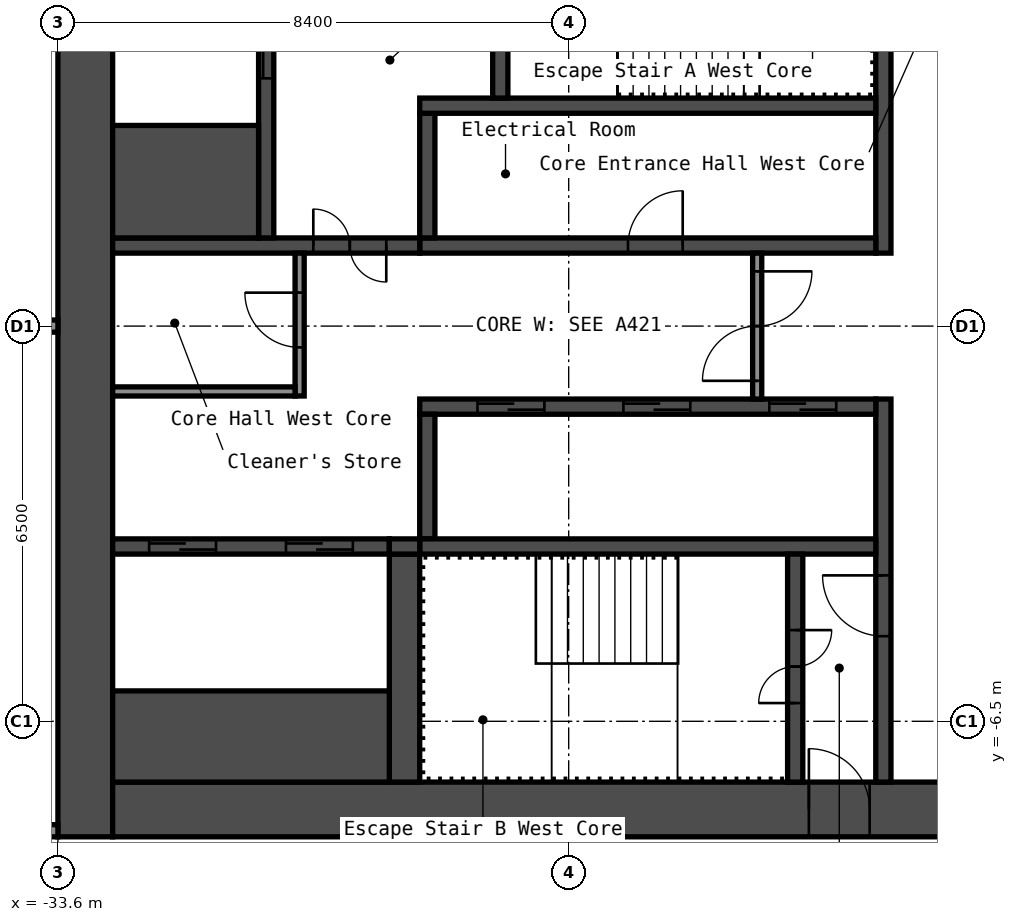
"""IFC4 building model, lengths in metres.
Left out: names, types, materials, properties, quantities, classifications, styles, units other than length and angle.
Written with IfcOpenShell. Run it as: python <this file> out.ifc"""

import sys

from ifc_helpers import new_model, si_unit, direction, frame, frame_2d, origin, place, context, subcontext, project, spatial, rectangle, extrude, element, fill, save


model = new_model("IFC4")
c1 = context("Model", 3, precision=1e-05, world=origin(), true_north=direction((0.0, 1.0)))
c2 = subcontext(c1, "Body", "Model", "MODEL_VIEW")
j1 = project(units=[si_unit("LENGTHUNIT", "METRE"), si_unit("PLANEANGLEUNIT", "RADIAN")], contexts=[c1])
p1 = place(None, origin())
s1 = spatial("IfcSite", under=j1, at=p1, CompositionType="ELEMENT")
p2 = place(p1, origin())
s2 = spatial("IfcBuilding", under=s1, at=p2, CompositionType="ELEMENT")
p3 = place(p2, frame((0.0, 0.0, 134.2)))
s3 = spatial("IfcBuildingStorey", under=s2, at=p3, CompositionType="ELEMENT", Elevation=134.2)
p4 = place(p3, frame((-33.15, -8.4, 0.0), z_axis=(0.0, 0.0, 1.0), x_axis=(0.0, 1.0, 0.0)))
e1 = element("IfcWall", 1, at=p4, inside=s3, PredefinedType="SHEAR", context=c2, shape_type="SweptSolid", body=[
    extrude(rectangle(XDim=16.8, YDim=0.9, at=frame_2d((8.4, 0.0))), origin(), (0.0, 0.0, 1.0), 2.75),
])
p5 = place(p3, frame((-32.7, -7.95, 0.0), z_axis=(0.0, 0.0, 1.0), x_axis=(1.0, 0.0, 0.0)))
e2 = element("IfcWall", 2, at=p5, inside=s3, PredefinedType="SHEAR", context=c2, shape_type="SweptSolid", body=[
    extrude(rectangle(XDim=15.0, YDim=0.9, at=frame_2d((7.5, 0.0))), origin(), (0.0, 0.0, 1.0), 2.75),
])
p6 = place(p5, frame((11.45, 0.0, 0.0)))
e3 = element("IfcOpeningElement", 3, at=p6, cuts=e2, PredefinedType="OPENING", context=c2, shape_type="SweptSolid", body=[
    extrude(rectangle(XDim=1.0, YDim=2.1, at=frame_2d((0.5, 1.05))), frame((0.0, 0.46, 0.0), z_axis=(0.0, -1.0, 0.0), x_axis=(1.0, 0.0, 0.0)), (0.0, 0.0, 1.0), 0.92),
])
p7 = place(p3, frame((-20.025, 1.2, 0.0), z_axis=(0.0, 0.0, 1.0), x_axis=(0.0, 1.0, 0.0)))
e4 = element("IfcWall", 4, at=p7, inside=s3, PredefinedType="SHEAR", context=c2, shape_type="SweptSolid", body=[
    extrude(rectangle(XDim=6.3, YDim=0.25, at=frame_2d((3.15, 0.0))), origin(), (0.0, 0.0, 1.0), 2.75),
])
p8 = place(p3, frame((-20.025, -7.5, 0.0), z_axis=(0.0, 0.0, 1.0), x_axis=(0.0, 1.0, 0.0)))
e5 = element("IfcWall", 5, at=p8, inside=s3, PredefinedType="SHEAR", context=c2, shape_type="SweptSolid", body=[
    extrude(rectangle(XDim=6.3, YDim=0.25, at=frame_2d((3.15, 0.0))), origin(), (0.0, 0.0, 1.0), 2.75),
])
p9 = place(p8, frame((2.4, 0.0, 0.0)))
e6 = element("IfcOpeningElement", 6, at=p9, cuts=e5, PredefinedType="OPENING", context=c2, shape_type="SweptSolid", body=[
    extrude(rectangle(XDim=1.0, YDim=2.1, at=frame_2d((0.5, 1.05))), frame((0.0, 0.135, 0.0), z_axis=(0.0, -1.0, 0.0), x_axis=(1.0, 0.0, 0.0)), (0.0, 0.0, 1.0), 0.27),
])
p10 = place(p3, frame((-27.65, 1.325, 0.0), z_axis=(0.0, 0.0, 1.0), x_axis=(1.0, 0.0, 0.0)))
e7 = element("IfcWall", 7, at=p10, inside=s3, PredefinedType="SHEAR", context=c2, shape_type="SweptSolid", body=[
    extrude(rectangle(XDim=7.5, YDim=0.25, at=frame_2d((3.75, 0.0))), origin(), (0.0, 0.0, 1.0), 2.75),
])
p11 = place(p10, frame((3.425, 0.0, 0.0)))
e8 = element("IfcOpeningElement", 8, at=p11, cuts=e7, PredefinedType="OPENING", context=c2, shape_type="SweptSolid", body=[
    extrude(rectangle(XDim=0.9, YDim=2.1, at=frame_2d((0.45, 1.05))), frame((0.0, 0.135, 0.0), z_axis=(0.0, -1.0, 0.0), x_axis=(1.0, 0.0, 0.0)), (0.0, 0.0, 1.0), 0.27),
])
p12 = place(p3, frame((-27.525, 1.45, 0.0), z_axis=(0.0, 0.0, 1.0), x_axis=(0.0, 1.0, 0.0)))
e9 = element("IfcWall", 9, at=p12, inside=s3, PredefinedType="SHEAR", context=c2, shape_type="SweptSolid", body=[
    extrude(rectangle(XDim=2.05, YDim=0.25, at=frame_2d((1.025, 0.0))), origin(), (0.0, 0.0, 1.0), 2.75),
])
p13 = place(p3, frame((-27.65, 3.625, 0.0), z_axis=(0.0, 0.0, 1.0), x_axis=(1.0, 0.0, 0.0)))
e10 = element("IfcWall", 10, at=p13, inside=s3, PredefinedType="SHEAR", context=c2, shape_type="SweptSolid", body=[
    extrude(rectangle(XDim=7.5, YDim=0.25, at=frame_2d((3.75, 0.0))), origin(), (0.0, 0.0, 1.0), 2.75),
])
p14 = place(p3, frame((-26.325, 3.75, 0.0), z_axis=(0.0, 0.0, 1.0), x_axis=(0.0, 1.0, 0.0)))
e11 = element("IfcWall", 11, at=p14, inside=s3, PredefinedType="SHEAR", context=c2, shape_type="SweptSolid", body=[
    extrude(rectangle(XDim=3.75, YDim=0.25, at=frame_2d((1.875, 0.0))), origin(), (0.0, 0.0, 1.0), 2.75),
])
p15 = place(p14, frame((1.25, 0.0, 0.0)))
e12 = element("IfcOpeningElement", 12, at=p15, cuts=e11, PredefinedType="OPENING", context=c2, shape_type="SweptSolid", body=[
    extrude(rectangle(XDim=1.2, YDim=2.1, at=frame_2d((0.6, 1.05))), frame((0.0, 0.135, 0.0), z_axis=(0.0, -1.0, 0.0), x_axis=(1.0, 0.0, 0.0)), (0.0, 0.0, 1.0), 0.27),
])
p16 = place(p3, frame((-32.7, 1.325, 0.0), z_axis=(0.0, 0.0, 1.0), x_axis=(1.0, 0.0, 0.0)))
e13 = element("IfcWall", 13, at=p16, inside=s3, PredefinedType="SHEAR", context=c2, shape_type="SweptSolid", body=[
    extrude(rectangle(XDim=5.05, YDim=0.25, at=frame_2d((2.525, 0.0))), origin(), (0.0, 0.0, 1.0), 2.75),
])
p17 = place(p16, frame((3.3, 0.0, 0.0)))
e14 = element("IfcOpeningElement", 14, at=p17, cuts=e13, PredefinedType="OPENING", context=c2, shape_type="SweptSolid", body=[
    extrude(rectangle(XDim=1.2, YDim=2.1, at=frame_2d((0.6, 1.05))), frame((0.0, 0.135, 0.0), z_axis=(0.0, -1.0, 0.0), x_axis=(1.0, 0.0, 0.0)), (0.0, 0.0, 1.0), 0.27),
])
p18 = place(p3, frame((-30.175, 1.45, 0.0), z_axis=(0.0, 0.0, 1.0), x_axis=(0.0, 1.0, 0.0)))
e15 = element("IfcWall", 15, at=p18, inside=s3, PredefinedType="SHEAR", context=c2, shape_type="SweptSolid", body=[
    extrude(rectangle(XDim=6.05, YDim=0.25, at=frame_2d((3.025, 0.0))), origin(), (0.0, 0.0, 1.0), 2.75),
])
p19 = place(p18, frame((2.625, 0.0, 0.0)))
e16 = element("IfcOpeningElement", 16, at=p19, cuts=e15, PredefinedType="OPENING", context=c2, shape_type="SweptSolid", body=[
    extrude(rectangle(XDim=1.1, YDim=2.1, at=frame_2d((0.55, 1.05))), frame((0.0, 0.135, 0.0), z_axis=(0.0, -1.0, 0.0), x_axis=(1.0, 0.0, 0.0)), (0.0, 0.0, 1.0), 0.27),
])
p20 = place(p3, frame((-32.7, 2.375, 0.0), z_axis=(0.0, 0.0, 1.0), x_axis=(1.0, 0.0, 0.0)))
e17 = element("IfcWall", 17, at=p20, inside=s3, PredefinedType="SHEAR", context=c2, shape_type="SweptSolid", body=[
    extrude(rectangle(XDim=2.4, YDim=1.85, at=frame_2d((1.2, 0.0))), origin(), (0.0, 0.0, 1.0), 2.75),
])
p21 = place(p3, frame((-27.65, -1.325, 0.0), z_axis=(0.0, 0.0, 1.0), x_axis=(1.0, 0.0, 0.0)))
e18 = element("IfcWall", 18, at=p21, inside=s3, PredefinedType="SHEAR", context=c2, shape_type="SweptSolid", body=[
    extrude(rectangle(XDim=7.5, YDim=0.25, at=frame_2d((3.75, 0.0))), origin(), (0.0, 0.0, 1.0), 2.75),
])
p22 = place(p21, frame((5.75, 0.0, 0.0)))
e19 = element("IfcOpeningElement", 19, at=p22, cuts=e18, PredefinedType="OPENING", context=c2, shape_type="SweptSolid", body=[
    extrude(rectangle(XDim=1.1, YDim=2.1, at=frame_2d((0.55, 1.05))), frame((0.0, 0.135, 0.0), z_axis=(0.0, -1.0, 0.0), x_axis=(1.0, 0.0, 0.0)), (0.0, 0.0, 1.0), 0.27),
])
p23 = place(p21, frame((3.35, 0.0, 0.0)))
e20 = element("IfcOpeningElement", 20, at=p23, cuts=e18, PredefinedType="OPENING", context=c2, shape_type="SweptSolid", body=[
    extrude(rectangle(XDim=1.1, YDim=2.1, at=frame_2d((0.55, 1.05))), frame((0.0, 0.135, 0.0), z_axis=(0.0, -1.0, 0.0), x_axis=(1.0, 0.0, 0.0)), (0.0, 0.0, 1.0), 0.27),
])
p24 = place(p21, frame((0.95, 0.0, 0.0)))
e21 = element("IfcOpeningElement", 21, at=p24, cuts=e18, PredefinedType="OPENING", context=c2, shape_type="SweptSolid", body=[
    extrude(rectangle(XDim=1.1, YDim=2.1, at=frame_2d((0.55, 1.05))), frame((0.0, 0.135, 0.0), z_axis=(0.0, -1.0, 0.0), x_axis=(1.0, 0.0, 0.0)), (0.0, 0.0, 1.0), 0.27),
])
p25 = place(p3, frame((-27.525, -3.5, 0.0), z_axis=(0.0, 0.0, 1.0), x_axis=(0.0, 1.0, 0.0)))
e22 = element("IfcWall", 22, at=p25, inside=s3, PredefinedType="SHEAR", context=c2, shape_type="SweptSolid", body=[
    extrude(rectangle(XDim=2.05, YDim=0.25, at=frame_2d((1.025, 0.0))), origin(), (0.0, 0.0, 1.0), 2.75),
])
p26 = place(p3, frame((-27.65, -3.625, 0.0), z_axis=(0.0, 0.0, 1.0), x_axis=(1.0, 0.0, 0.0)))
e23 = element("IfcWall", 23, at=p26, inside=s3, PredefinedType="SHEAR", context=c2, shape_type="SweptSolid", body=[
    extrude(rectangle(XDim=7.5, YDim=0.25, at=frame_2d((3.75, 0.0))), origin(), (0.0, 0.0, 1.0), 2.75),
])
p27 = place(p3, frame((-21.475, -7.5, 0.0), z_axis=(0.0, 0.0, 1.0), x_axis=(0.0, 1.0, 0.0)))
e24 = element("IfcWall", 24, at=p27, inside=s3, PredefinedType="SHEAR", context=c2, shape_type="SweptSolid", body=[
    extrude(rectangle(XDim=3.75, YDim=0.25, at=frame_2d((1.875, 0.0))), origin(), (0.0, 0.0, 1.0), 2.75),
])
p28 = place(p27, frame((1.3, 0.0, 0.0)))
e25 = element("IfcOpeningElement", 25, at=p28, cuts=e24, PredefinedType="OPENING", context=c2, shape_type="SweptSolid", body=[
    extrude(rectangle(XDim=1.2, YDim=2.1, at=frame_2d((0.6, 1.05))), frame((0.0, 0.135, 0.0), z_axis=(0.0, -1.0, 0.0), x_axis=(1.0, 0.0, 0.0)), (0.0, 0.0, 1.0), 0.27),
])
p29 = place(p3, frame((-27.9, -7.5, 0.0), z_axis=(0.0, 0.0, 1.0), x_axis=(0.0, 1.0, 0.0)))
e26 = element("IfcWall", 26, at=p29, inside=s3, PredefinedType="SHEAR", context=c2, shape_type="SweptSolid", body=[
    extrude(rectangle(XDim=3.75, YDim=0.5, at=frame_2d((1.875, 0.0))), origin(), (0.0, 0.0, 1.0), 2.75),
])
p30 = place(p3, frame((-32.7, -3.625, 0.0), z_axis=(0.0, 0.0, 1.0), x_axis=(1.0, 0.0, 0.0)))
e27 = element("IfcWall", 27, at=p30, inside=s3, PredefinedType="SHEAR", context=c2, shape_type="SweptSolid", body=[
    extrude(rectangle(XDim=4.55, YDim=0.25, at=frame_2d((2.275, 0.0))), origin(), (0.0, 0.0, 1.0), 2.75),
])
p31 = place(p30, frame((2.85, 0.0, 0.0)))
e28 = element("IfcOpeningElement", 28, at=p31, cuts=e27, PredefinedType="OPENING", context=c2, shape_type="SweptSolid", body=[
    extrude(rectangle(XDim=1.1, YDim=2.1, at=frame_2d((0.55, 1.05))), frame((0.0, 0.135, 0.0), z_axis=(0.0, -1.0, 0.0), x_axis=(1.0, 0.0, 0.0)), (0.0, 0.0, 1.0), 0.27),
])
p32 = place(p30, frame((0.6, 0.0, 0.0)))
e29 = element("IfcOpeningElement", 29, at=p32, cuts=e27, PredefinedType="OPENING", context=c2, shape_type="SweptSolid", body=[
    extrude(rectangle(XDim=1.1, YDim=2.1, at=frame_2d((0.55, 1.05))), frame((0.0, 0.135, 0.0), z_axis=(0.0, -1.0, 0.0), x_axis=(1.0, 0.0, 0.0)), (0.0, 0.0, 1.0), 0.27),
])
p33 = place(p3, frame((-32.7, -6.75, 0.0), z_axis=(0.0, 0.0, 1.0), x_axis=(1.0, 0.0, 0.0)))
e30 = element("IfcWall", 30, at=p33, inside=s3, PredefinedType="SHEAR", context=c2, shape_type="SweptSolid", body=[
    extrude(rectangle(XDim=4.55, YDim=1.5, at=frame_2d((2.275, 0.0))), origin(), (0.0, 0.0, 1.0), 2.75),
])
p34 = place(p3, frame((-28.15, -3.625, 0.0), z_axis=(0.0, 0.0, 1.0), x_axis=(1.0, 0.0, 0.0)))
e31 = element("IfcWall", 31, at=p34, inside=s3, PredefinedType="SHEAR", context=c2, shape_type="SweptSolid", body=[
    extrude(rectangle(XDim=0.5, YDim=0.25, at=frame_2d((0.25, 0.0))), origin(), (0.0, 0.0, 1.0), 2.75),
])
p35 = place(p3, frame((-22.1, -1.2, 0.0), z_axis=(0.0, 0.0, 1.0), x_axis=(0.0, 1.0, 0.0)))
e32 = element("IfcWall", 32, at=p35, inside=s3, PredefinedType="PARTITIONING", context=c2, shape_type="SweptSolid", body=[
    extrude(rectangle(XDim=2.4, YDim=0.15, at=frame_2d((1.2, 0.0))), origin(), (0.0, 0.0, 1.0), 2.75),
])
p36 = place(p35, frame((0.3, 0.0, 0.0)))
e33 = element("IfcOpeningElement", 33, at=p36, cuts=e32, PredefinedType="OPENING", context=c2, shape_type="SweptSolid", body=[
    extrude(rectangle(XDim=1.8, YDim=2.1, at=frame_2d((0.9, 1.05))), frame((0.0, 0.085, 0.0), z_axis=(0.0, -1.0, 0.0), x_axis=(1.0, 0.0, 0.0)), (0.0, 0.0, 1.0), 0.17),
])
p37 = place(p3, frame((-29.625, -1.15, 0.0), z_axis=(0.0, 0.0, 1.0), x_axis=(0.0, 1.0, 0.0)))
e34 = element("IfcWall", 34, at=p37, inside=s3, PredefinedType="PARTITIONING", context=c2, shape_type="SweptSolid", body=[
    extrude(rectangle(XDim=2.35, YDim=0.15, at=frame_2d((1.175, 0.0))), origin(), (0.0, 0.0, 1.0), 2.75),
])
p38 = place(p37, frame((0.8, 0.0, 0.0)))
e35 = element("IfcOpeningElement", 35, at=p38, cuts=e34, PredefinedType="OPENING", context=c2, shape_type="SweptSolid", body=[
    extrude(rectangle(XDim=0.9, YDim=2.1, at=frame_2d((0.45, 1.05))), frame((0.0, 0.085, 0.0), z_axis=(0.0, -1.0, 0.0), x_axis=(1.0, 0.0, 0.0)), (0.0, 0.0, 1.0), 0.17),
])
p39 = place(p3, frame((-32.7, -1.075, 0.0), z_axis=(0.0, 0.0, 1.0), x_axis=(1.0, 0.0, 0.0)))
e36 = element("IfcWall", 36, at=p39, inside=s3, PredefinedType="PARTITIONING", context=c2, shape_type="SweptSolid", body=[
    extrude(rectangle(XDim=3.0, YDim=0.15, at=frame_2d((1.5, 0.0))), origin(), (0.0, 0.0, 1.0), 2.75),
])
p40 = place(p3, frame((-40.2, -8.3, 0.0), z_axis=(0.0, 0.0, 1.0), x_axis=(1.0, 0.0, 0.0)))
e37 = element("IfcWall", 37, at=p40, inside=s3, PredefinedType="PARTITIONING", context=c2, shape_type="SweptSolid", body=[
    extrude(rectangle(XDim=6.6, YDim=0.2, at=frame_2d((3.3, 0.0))), origin(), (0.0, 0.0, 1.0), 2.75),
])
p41 = place(p40, frame((1.0, 0.0, 0.0)))
e38 = element("IfcOpeningElement", 38, at=p41, cuts=e37, PredefinedType="OPENING", context=c2, shape_type="SweptSolid", body=[
    extrude(rectangle(XDim=0.9, YDim=2.1, at=frame_2d((0.45, 1.05))), frame((0.0, 0.11, 0.0), z_axis=(0.0, -1.0, 0.0), x_axis=(1.0, 0.0, 0.0)), (0.0, 0.0, 1.0), 0.22),
])
p42 = place(p40, frame((4.3, 0.0, 0.0)))
e39 = element("IfcOpeningElement", 39, at=p42, cuts=e37, PredefinedType="OPENING", context=c2, shape_type="SweptSolid", body=[
    extrude(rectangle(XDim=0.9, YDim=2.1, at=frame_2d((0.45, 1.05))), frame((0.0, 0.11, 0.0), z_axis=(0.0, -1.0, 0.0), x_axis=(1.0, 0.0, 0.0)), (0.0, 0.0, 1.0), 0.22),
])
p43 = place(p3, frame((-40.1, 0.0, 0.0), z_axis=(0.0, 0.0, 1.0), x_axis=(1.0, 0.0, 0.0)))
e40 = element("IfcWall", 40, at=p43, inside=s3, PredefinedType="PARTITIONING", context=c2, shape_type="SweptSolid", body=[
    extrude(rectangle(XDim=6.5, YDim=0.2, at=frame_2d((3.25, 0.0))), origin(), (0.0, 0.0, 1.0), 2.75),
])
p44 = place(p6, origin())
e41 = element("IfcDoor", 41, at=p44, inside=s3, OperationType="SINGLE_SWING_RIGHT", PredefinedType="DOOR", context=c2, shape_type="SweptSolid", body=[
    extrude(rectangle(XDim=1.0, YDim=2.1, at=frame_2d((0.5, 1.05))), frame((0.0, 0.025, 0.0), z_axis=(0.0, -1.0, 0.0), x_axis=(1.0, 0.0, 0.0)), (0.0, 0.0, 1.0), 0.05),
])
fill(e3, e41)
p45 = place(p28, origin())
e42 = element("IfcDoor", 42, at=p45, inside=s3, OperationType="DOUBLE_DOOR_SINGLE_SWING", PredefinedType="DOOR", context=c2, shape_type="SweptSolid", body=[
    extrude(rectangle(XDim=1.2, YDim=2.1, at=frame_2d((0.6, 1.05))), frame((0.0, 0.025, 0.0), z_axis=(0.0, -1.0, 0.0), x_axis=(1.0, 0.0, 0.0)), (0.0, 0.0, 1.0), 0.05),
])
fill(e25, e42)
p46 = place(p9, origin())
e43 = element("IfcDoor", 43, at=p46, inside=s3, OperationType="SINGLE_SWING_LEFT", PredefinedType="DOOR", context=c2, shape_type="SweptSolid", body=[
    extrude(rectangle(XDim=1.0, YDim=2.1, at=frame_2d((0.5, 1.05))), frame((0.0, 0.025, 0.0), z_axis=(0.0, -1.0, 0.0), x_axis=(1.0, 0.0, 0.0)), (0.0, 0.0, 1.0), 0.05),
])
fill(e6, e43)
p47 = place(p17, origin())
e44 = element("IfcDoor", 44, at=p47, inside=s3, OperationType="DOUBLE_DOOR_SINGLE_SWING", PredefinedType="DOOR", context=c2, shape_type="SweptSolid", body=[
    extrude(rectangle(XDim=1.2, YDim=2.1, at=frame_2d((0.6, 1.05))), frame((0.0, 0.025, 0.0), z_axis=(0.0, -1.0, 0.0), x_axis=(1.0, 0.0, 0.0)), (0.0, 0.0, 1.0), 0.05),
])
fill(e14, e44)
p48 = place(p36, origin())
e45 = element("IfcDoor", 45, at=p48, inside=s3, OperationType="DOUBLE_DOOR_SINGLE_SWING", PredefinedType="DOOR", context=c2, shape_type="SweptSolid", body=[
    extrude(rectangle(XDim=1.8, YDim=2.1, at=frame_2d((0.9, 1.05))), frame((0.0, 0.025, 0.0), z_axis=(0.0, -1.0, 0.0), x_axis=(1.0, 0.0, 0.0)), (0.0, 0.0, 1.0), 0.05),
])
fill(e33, e45)
p49 = place(p38, origin())
e46 = element("IfcDoor", 46, at=p49, inside=s3, OperationType="SINGLE_SWING_LEFT", PredefinedType="DOOR", context=c2, shape_type="SweptSolid", body=[
    extrude(rectangle(XDim=0.9, YDim=2.1, at=frame_2d((0.45, 1.05))), frame((0.0, 0.025, 0.0), z_axis=(0.0, -1.0, 0.0), x_axis=(1.0, 0.0, 0.0)), (0.0, 0.0, 1.0), 0.05),
])
fill(e35, e46)
p50 = place(p11, origin())
e47 = element("IfcDoor", 47, at=p50, inside=s3, OperationType="SINGLE_SWING_LEFT", PredefinedType="DOOR", context=c2, shape_type="SweptSolid", body=[
    extrude(rectangle(XDim=0.9, YDim=2.1, at=frame_2d((0.45, 1.05))), frame((0.0, 0.025, 0.0), z_axis=(0.0, -1.0, 0.0), x_axis=(1.0, 0.0, 0.0)), (0.0, 0.0, 1.0), 0.05),
])
fill(e8, e47)
p51 = place(p22, origin())
e48 = element("IfcDoor", 48, at=p51, inside=s3, OperationType="DOUBLE_DOOR_SLIDING", PredefinedType="DOOR", context=c2, shape_type="SweptSolid", body=[
    extrude(rectangle(XDim=1.1, YDim=2.1, at=frame_2d((0.55, 1.05))), frame((0.0, 0.025, 0.0), z_axis=(0.0, -1.0, 0.0), x_axis=(1.0, 0.0, 0.0)), (0.0, 0.0, 1.0), 0.05),
])
fill(e19, e48)
p52 = place(p23, origin())
e49 = element("IfcDoor", 49, at=p52, inside=s3, OperationType="DOUBLE_DOOR_SLIDING", PredefinedType="DOOR", context=c2, shape_type="SweptSolid", body=[
    extrude(rectangle(XDim=1.1, YDim=2.1, at=frame_2d((0.55, 1.05))), frame((0.0, 0.025, 0.0), z_axis=(0.0, -1.0, 0.0), x_axis=(1.0, 0.0, 0.0)), (0.0, 0.0, 1.0), 0.05),
])
fill(e20, e49)
p53 = place(p24, origin())
e50 = element("IfcDoor", 50, at=p53, inside=s3, OperationType="DOUBLE_DOOR_SLIDING", PredefinedType="DOOR", context=c2, shape_type="SweptSolid", body=[
    extrude(rectangle(XDim=1.1, YDim=2.1, at=frame_2d((0.55, 1.05))), frame((0.0, 0.025, 0.0), z_axis=(0.0, -1.0, 0.0), x_axis=(1.0, 0.0, 0.0)), (0.0, 0.0, 1.0), 0.05),
])
fill(e21, e50)
p54 = place(p19, origin())
e51 = element("IfcDoor", 51, at=p54, inside=s3, OperationType="DOUBLE_DOOR_SLIDING", PredefinedType="DOOR", context=c2, shape_type="SweptSolid", body=[
    extrude(rectangle(XDim=1.1, YDim=2.1, at=frame_2d((0.55, 1.05))), frame((0.0, 0.025, 0.0), z_axis=(0.0, -1.0, 0.0), x_axis=(1.0, 0.0, 0.0)), (0.0, 0.0, 1.0), 0.05),
])
fill(e16, e51)
p55 = place(p31, origin())
e52 = element("IfcDoor", 52, at=p55, inside=s3, OperationType="DOUBLE_DOOR_SLIDING", PredefinedType="DOOR", context=c2, shape_type="SweptSolid", body=[
    extrude(rectangle(XDim=1.1, YDim=2.1, at=frame_2d((0.55, 1.05))), frame((0.0, 0.025, 0.0), z_axis=(0.0, -1.0, 0.0), x_axis=(1.0, 0.0, 0.0)), (0.0, 0.0, 1.0), 0.05),
])
fill(e28, e52)
p56 = place(p32, origin())
e53 = element("IfcDoor", 53, at=p56, inside=s3, OperationType="DOUBLE_DOOR_SLIDING", PredefinedType="DOOR", context=c2, shape_type="SweptSolid", body=[
    extrude(rectangle(XDim=1.1, YDim=2.1, at=frame_2d((0.55, 1.05))), frame((0.0, 0.025, 0.0), z_axis=(0.0, -1.0, 0.0), x_axis=(1.0, 0.0, 0.0)), (0.0, 0.0, 1.0), 0.05),
])
fill(e29, e53)
save(model, sys.argv[1])
